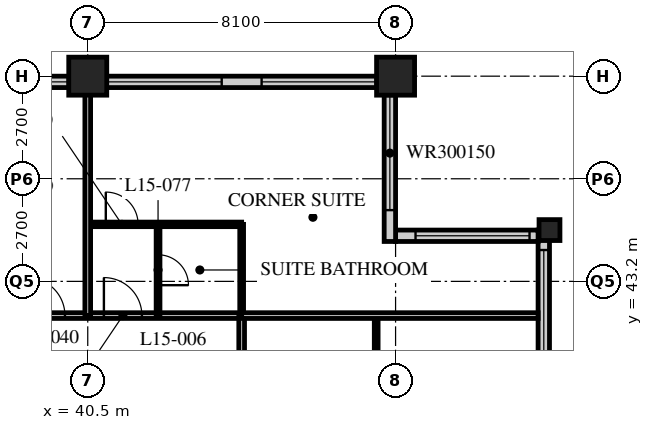
"""IFC4 building model, lengths in metres.
Left out: names, types, materials, properties, quantities, classifications, styles, units other than length and angle.
Written with IfcOpenShell. Run it as: python <this file> out.ifc"""

import sys

from ifc_helpers import new_model, si_unit, direction, frame, frame_2d, origin, origin_2d, place, context, subcontext, project, spatial, rectangle, hollow_rectangle, extrude, element, fill, save


model = new_model("IFC4")
c1 = context("Model", 3, precision=1e-05, world=origin(), true_north=direction((0.0, 1.0)))
c2 = subcontext(c1, "Body", "Model", "MODEL_VIEW")
j1 = project(units=[si_unit("LENGTHUNIT", "METRE"), si_unit("PLANEANGLEUNIT", "RADIAN")], contexts=[c1])
p1 = place(None, origin())
s1 = spatial("IfcSite", under=j1, at=p1, CompositionType="ELEMENT")
p2 = place(p1, origin())
s2 = spatial("IfcBuilding", under=s1, at=p2, CompositionType="ELEMENT")
p3 = place(p2, frame((0.0, 0.0, 63.6)))
s3 = spatial("IfcBuildingStorey", under=s2, at=p3, CompositionType="ELEMENT", Elevation=63.6)
for number, where, z_axis, x_axis in (
    (1, (40.5, 48.6, 0.0), (0.0, 0.0, 1.0), (1.0, 0.0, 0.0)),
    (2, (48.6, 48.6, 0.0), (0.0, 0.0, 1.0), (1.0, 0.0, 0.0)),
):
    element("IfcColumn", number, at=place(p3, frame(where, z_axis=z_axis, x_axis=x_axis)), inside=s3, PredefinedType="COLUMN", context=c2, shape_type="SweptSolid", body=[
        extrude(hollow_rectangle(XDim=1.0, YDim=1.0, WallThickness=0.1, at=origin_2d()), origin(), (0.0, 0.0, 1.0), 3.4),
    ])
p4 = place(p3, frame((52.65, 44.55, 0.0), z_axis=(0.0, 0.0, 1.0), x_axis=(1.0, 0.0, 0.0)))
e3 = element("IfcColumn", 3, at=p4, inside=s3, PredefinedType="COLUMN", context=c2, shape_type="SweptSolid", body=[
    extrude(hollow_rectangle(XDim=0.55, YDim=0.55, WallThickness=0.05, at=origin_2d()), origin(), (0.0, 0.0, 1.0), 3.4),
])
p5 = place(p3, frame((52.5, 40.2, 0.0), z_axis=(0.0, 0.0, 1.0), x_axis=(0.0, 1.0, 0.0)))
e4 = element("IfcWall", 4, at=p5, inside=s3, PredefinedType="SOLIDWALL", context=c2, shape_type="SweptSolid", body=[
    extrude(rectangle(XDim=4.35, YDim=0.3, at=frame_2d((2.175, 0.0))), origin(), (0.0, 0.0, 1.0), 3.19),
])
p6 = place(p5, frame((0.825, 0.0, 0.9)))
e5 = element("IfcOpeningElement", 5, at=p6, cuts=e4, PredefinedType="OPENING", context=c2, shape_type="SweptSolid", body=[
    extrude(rectangle(XDim=3.0, YDim=1.5, at=frame_2d((1.5, 0.75))), frame((0.0, 0.16, 0.0), z_axis=(0.0, -1.0, 0.0), x_axis=(1.0, 0.0, 0.0)), (0.0, 0.0, 1.0), 0.32),
])
p7 = place(p3, frame((52.35, 44.4, 0.0), z_axis=(0.0, 0.0, 1.0), x_axis=(-1.0, 0.0, 0.0)))
e6 = element("IfcWall", 6, at=p7, inside=s3, PredefinedType="SOLIDWALL", context=c2, shape_type="SweptSolid", body=[
    extrude(rectangle(XDim=3.75, YDim=0.3, at=frame_2d((1.875, 0.0))), origin(), (0.0, 0.0, 1.0), 3.19),
])
p8 = place(p7, frame((0.225, 0.0, 0.9)))
e7 = element("IfcOpeningElement", 7, at=p8, cuts=e6, PredefinedType="OPENING", context=c2, shape_type="SweptSolid", body=[
    extrude(rectangle(XDim=3.0, YDim=1.5, at=frame_2d((1.5, 0.75))), frame((0.0, 0.16, 0.0), z_axis=(0.0, -1.0, 0.0), x_axis=(1.0, 0.0, 0.0)), (0.0, 0.0, 1.0), 0.32),
])
p9 = place(p3, frame((48.45, 44.25, 0.0), z_axis=(0.0, 0.0, 1.0), x_axis=(0.0, 1.0, 0.0)))
e8 = element("IfcWall", 8, at=p9, inside=s3, PredefinedType="SOLIDWALL", context=c2, shape_type="SweptSolid", body=[
    extrude(rectangle(XDim=4.35, YDim=0.3, at=frame_2d((2.175, 0.0))), origin(), (0.0, 0.0, 1.0), 3.19),
])
p10 = place(p9, frame((0.825, 0.0, 0.9)))
e9 = element("IfcOpeningElement", 9, at=p10, cuts=e8, PredefinedType="OPENING", context=c2, shape_type="SweptSolid", body=[
    extrude(rectangle(XDim=3.0, YDim=1.5, at=frame_2d((1.5, 0.75))), frame((0.0, 0.16, 0.0), z_axis=(0.0, -1.0, 0.0), x_axis=(1.0, 0.0, 0.0)), (0.0, 0.0, 1.0), 0.32),
])
p11 = place(p3, frame((48.3, 48.45, 0.0), z_axis=(0.0, 0.0, 1.0), x_axis=(-1.0, 0.0, 0.0)))
e10 = element("IfcWall", 10, at=p11, inside=s3, PredefinedType="SOLIDWALL", context=c2, shape_type="SweptSolid", body=[
    extrude(rectangle(XDim=40.2, YDim=0.3, at=frame_2d((20.1, 0.0))), origin(), (0.0, 0.0, 1.0), 3.19),
])
p12 = place(p11, frame((0.225, 0.0, 0.9)))
e11 = element("IfcOpeningElement", 11, at=p12, cuts=e10, PredefinedType="OPENING", context=c2, shape_type="SweptSolid", body=[
    extrude(rectangle(XDim=3.0, YDim=2.0, at=frame_2d((1.5, 1.0))), frame((0.0, 0.16, 0.0), z_axis=(0.0, -1.0, 0.0), x_axis=(1.0, 0.0, 0.0)), (0.0, 0.0, 1.0), 0.32),
])
p13 = place(p11, frame((4.275, 0.0, 0.9)))
e12 = element("IfcOpeningElement", 12, at=p13, cuts=e10, PredefinedType="OPENING", context=c2, shape_type="SweptSolid", body=[
    extrude(rectangle(XDim=3.0, YDim=2.0, at=frame_2d((1.5, 1.0))), frame((0.0, 0.16, 0.0), z_axis=(0.0, -1.0, 0.0), x_axis=(1.0, 0.0, 0.0)), (0.0, 0.0, 1.0), 0.32),
])
p14 = place(p11, frame((8.325, 0.0, 0.9)))
e13 = element("IfcOpeningElement", 13, at=p14, cuts=e10, PredefinedType="OPENING", context=c2, shape_type="SweptSolid", body=[
    extrude(rectangle(XDim=3.0, YDim=2.0, at=frame_2d((1.5, 1.0))), frame((0.0, 0.16, 0.0), z_axis=(0.0, -1.0, 0.0), x_axis=(1.0, 0.0, 0.0)), (0.0, 0.0, 1.0), 0.32),
])
p15 = place(p11, frame((12.375, 0.0, 0.9)))
e14 = element("IfcOpeningElement", 14, at=p15, cuts=e10, PredefinedType="OPENING", context=c2, shape_type="SweptSolid", body=[
    extrude(rectangle(XDim=3.0, YDim=2.0, at=frame_2d((1.5, 1.0))), frame((0.0, 0.16, 0.0), z_axis=(0.0, -1.0, 0.0), x_axis=(1.0, 0.0, 0.0)), (0.0, 0.0, 1.0), 0.32),
])
p16 = place(p11, frame((16.425, 0.0, 0.9)))
e15 = element("IfcOpeningElement", 15, at=p16, cuts=e10, PredefinedType="OPENING", context=c2, shape_type="SweptSolid", body=[
    extrude(rectangle(XDim=3.0, YDim=2.0, at=frame_2d((1.5, 1.0))), frame((0.0, 0.16, 0.0), z_axis=(0.0, -1.0, 0.0), x_axis=(1.0, 0.0, 0.0)), (0.0, 0.0, 1.0), 0.32),
])
p17 = place(p11, frame((20.475, 0.0, 0.9)))
e16 = element("IfcOpeningElement", 16, at=p17, cuts=e10, PredefinedType="OPENING", context=c2, shape_type="SweptSolid", body=[
    extrude(rectangle(XDim=3.0, YDim=2.0, at=frame_2d((1.5, 1.0))), frame((0.0, 0.16, 0.0), z_axis=(0.0, -1.0, 0.0), x_axis=(1.0, 0.0, 0.0)), (0.0, 0.0, 1.0), 0.32),
])
p18 = place(p11, frame((24.525, 0.0, 0.9)))
e17 = element("IfcOpeningElement", 17, at=p18, cuts=e10, PredefinedType="OPENING", context=c2, shape_type="SweptSolid", body=[
    extrude(rectangle(XDim=3.0, YDim=2.0, at=frame_2d((1.5, 1.0))), frame((0.0, 0.16, 0.0), z_axis=(0.0, -1.0, 0.0), x_axis=(1.0, 0.0, 0.0)), (0.0, 0.0, 1.0), 0.32),
])
p19 = place(p11, frame((28.575, 0.0, 0.9)))
e18 = element("IfcOpeningElement", 18, at=p19, cuts=e10, PredefinedType="OPENING", context=c2, shape_type="SweptSolid", body=[
    extrude(rectangle(XDim=3.0, YDim=2.0, at=frame_2d((1.5, 1.0))), frame((0.0, 0.16, 0.0), z_axis=(0.0, -1.0, 0.0), x_axis=(1.0, 0.0, 0.0)), (0.0, 0.0, 1.0), 0.32),
])
p20 = place(p11, frame((32.625, 0.0, 0.9)))
e19 = element("IfcOpeningElement", 19, at=p20, cuts=e10, PredefinedType="OPENING", context=c2, shape_type="SweptSolid", body=[
    extrude(rectangle(XDim=3.0, YDim=2.0, at=frame_2d((1.5, 1.0))), frame((0.0, 0.16, 0.0), z_axis=(0.0, -1.0, 0.0), x_axis=(1.0, 0.0, 0.0)), (0.0, 0.0, 1.0), 0.32),
])
p21 = place(p11, frame((36.675, 0.0, 0.9)))
e20 = element("IfcOpeningElement", 20, at=p21, cuts=e10, PredefinedType="OPENING", context=c2, shape_type="SweptSolid", body=[
    extrude(rectangle(XDim=3.0, YDim=2.0, at=frame_2d((1.5, 1.0))), frame((0.0, 0.16, 0.0), z_axis=(0.0, -1.0, 0.0), x_axis=(1.0, 0.0, 0.0)), (0.0, 0.0, 1.0), 0.32),
])
p22 = place(p3, frame((8.1, 42.3, 0.0), z_axis=(0.0, 0.0, 1.0), x_axis=(1.0, 0.0, 0.0)))
e21 = element("IfcWall", 21, at=p22, inside=s3, PredefinedType="PARTITIONING", context=c2, shape_type="SweptSolid", body=[
    extrude(rectangle(XDim=36.45, YDim=0.15, at=frame_2d((18.225, 0.0))), origin(), (0.0, 0.0, 1.0), 3.19),
])
p23 = place(p22, frame((9.5, 0.0, 0.0)))
e22 = element("IfcOpeningElement", 22, at=p23, cuts=e21, PredefinedType="OPENING", context=c2, shape_type="SweptSolid", body=[
    extrude(rectangle(XDim=1.0, YDim=2.1, at=frame_2d((0.5, 1.05))), frame((0.0, 0.085, 0.0), z_axis=(0.0, -1.0, 0.0), x_axis=(1.0, 0.0, 0.0)), (0.0, 0.0, 1.0), 0.17),
])
p24 = place(p22, frame((14.6, 0.0, 0.0)))
e23 = element("IfcOpeningElement", 23, at=p24, cuts=e21, PredefinedType="OPENING", context=c2, shape_type="SweptSolid", body=[
    extrude(rectangle(XDim=1.0, YDim=2.1, at=frame_2d((0.5, 1.05))), frame((0.0, 0.085, 0.0), z_axis=(0.0, -1.0, 0.0), x_axis=(1.0, 0.0, 0.0)), (0.0, 0.0, 1.0), 0.17),
])
p25 = place(p22, frame((18.65, 0.0, 0.0)))
e24 = element("IfcOpeningElement", 24, at=p25, cuts=e21, PredefinedType="OPENING", context=c2, shape_type="SweptSolid", body=[
    extrude(rectangle(XDim=1.0, YDim=2.1, at=frame_2d((0.5, 1.05))), frame((0.0, 0.085, 0.0), z_axis=(0.0, -1.0, 0.0), x_axis=(1.0, 0.0, 0.0)), (0.0, 0.0, 1.0), 0.17),
])
p26 = place(p22, frame((25.7, 0.0, 0.0)))
e25 = element("IfcOpeningElement", 25, at=p26, cuts=e21, PredefinedType="OPENING", context=c2, shape_type="SweptSolid", body=[
    extrude(rectangle(XDim=1.0, YDim=2.1, at=frame_2d((0.5, 1.05))), frame((0.0, 0.085, 0.0), z_axis=(0.0, -1.0, 0.0), x_axis=(1.0, 0.0, 0.0)), (0.0, 0.0, 1.0), 0.17),
])
p27 = place(p22, frame((30.8, 0.0, 0.0)))
e26 = element("IfcOpeningElement", 26, at=p27, cuts=e21, PredefinedType="OPENING", context=c2, shape_type="SweptSolid", body=[
    extrude(rectangle(XDim=1.0, YDim=2.1, at=frame_2d((0.5, 1.05))), frame((0.0, 0.085, 0.0), z_axis=(0.0, -1.0, 0.0), x_axis=(1.0, 0.0, 0.0)), (0.0, 0.0, 1.0), 0.17),
])
p28 = place(p22, frame((32.825, 0.0, 0.0)))
e27 = element("IfcOpeningElement", 27, at=p28, cuts=e21, PredefinedType="OPENING", context=c2, shape_type="SweptSolid", body=[
    extrude(rectangle(XDim=1.0, YDim=2.1, at=frame_2d((0.5, 1.05))), frame((0.0, 0.085, 0.0), z_axis=(0.0, -1.0, 0.0), x_axis=(1.0, 0.0, 0.0)), (0.0, 0.0, 1.0), 0.17),
])
p29 = place(p22, frame((2.625, 0.0, 0.0)))
e28 = element("IfcOpeningElement", 28, at=p29, cuts=e21, PredefinedType="OPENING", context=c2, shape_type="SweptSolid", body=[
    extrude(rectangle(XDim=1.0, YDim=2.1, at=frame_2d((0.5, 1.05))), frame((0.0, 0.085, 0.0), z_axis=(0.0, -1.0, 0.0), x_axis=(1.0, 0.0, 0.0)), (0.0, 0.0, 1.0), 0.17),
])
p30 = place(p3, frame((44.55, 12.15, 0.0), z_axis=(0.0, 0.0, 1.0), x_axis=(0.0, 1.0, 0.0)))
e29 = element("IfcWall", 29, at=p30, inside=s3, PredefinedType="PARTITIONING", context=c2, shape_type="SweptSolid", body=[
    extrude(rectangle(XDim=30.15, YDim=0.15, at=frame_2d((15.075, 0.0))), origin(), (0.0, 0.0, 1.0), 3.19),
])
p31 = place(p30, frame((2.45, 0.0, 0.0)))
e30 = element("IfcOpeningElement", 30, at=p31, cuts=e29, PredefinedType="OPENING", context=c2, shape_type="SweptSolid", body=[
    extrude(rectangle(XDim=1.0, YDim=2.1, at=frame_2d((0.5, 1.05))), frame((0.0, 0.085, 0.0), z_axis=(0.0, -1.0, 0.0), x_axis=(1.0, 0.0, 0.0)), (0.0, 0.0, 1.0), 0.17),
])
p32 = place(p30, frame((4.35, 0.0, 0.0)))
e31 = element("IfcOpeningElement", 31, at=p32, cuts=e29, PredefinedType="OPENING", context=c2, shape_type="SweptSolid", body=[
    extrude(rectangle(XDim=1.0, YDim=2.1, at=frame_2d((0.5, 1.05))), frame((0.0, 0.085, 0.0), z_axis=(0.0, -1.0, 0.0), x_axis=(1.0, 0.0, 0.0)), (0.0, 0.0, 1.0), 0.17),
])
p33 = place(p30, frame((8.4, 0.0, 0.0)))
e32 = element("IfcOpeningElement", 32, at=p33, cuts=e29, PredefinedType="OPENING", context=c2, shape_type="SweptSolid", body=[
    extrude(rectangle(XDim=1.0, YDim=2.1, at=frame_2d((0.5, 1.05))), frame((0.0, 0.085, 0.0), z_axis=(0.0, -1.0, 0.0), x_axis=(1.0, 0.0, 0.0)), (0.0, 0.0, 1.0), 0.17),
])
p34 = place(p30, frame((14.6, 0.0, 0.0)))
e33 = element("IfcOpeningElement", 33, at=p34, cuts=e29, PredefinedType="OPENING", context=c2, shape_type="SweptSolid", body=[
    extrude(rectangle(XDim=1.0, YDim=2.1, at=frame_2d((0.5, 1.05))), frame((0.0, 0.085, 0.0), z_axis=(0.0, -1.0, 0.0), x_axis=(1.0, 0.0, 0.0)), (0.0, 0.0, 1.0), 0.17),
])
p35 = place(p30, frame((21.65, 0.0, 0.0)))
e34 = element("IfcOpeningElement", 34, at=p35, cuts=e29, PredefinedType="OPENING", context=c2, shape_type="SweptSolid", body=[
    extrude(rectangle(XDim=1.0, YDim=2.1, at=frame_2d((0.5, 1.05))), frame((0.0, 0.085, 0.0), z_axis=(0.0, -1.0, 0.0), x_axis=(1.0, 0.0, 0.0)), (0.0, 0.0, 1.0), 0.17),
])
p36 = place(p30, frame((26.7, 0.0, 0.0)))
e35 = element("IfcOpeningElement", 35, at=p36, cuts=e29, PredefinedType="OPENING", context=c2, shape_type="SweptSolid", body=[
    extrude(rectangle(XDim=1.0, YDim=2.1, at=frame_2d((0.5, 1.05))), frame((0.0, 0.085, 0.0), z_axis=(0.0, -1.0, 0.0), x_axis=(1.0, 0.0, 0.0)), (0.0, 0.0, 1.0), 0.17),
])
p37 = place(p3, frame((48.09, 40.0, 0.0), z_axis=(0.0, 0.0, 1.0), x_axis=(0.0, 1.0, 0.0)))
e36 = element("IfcWall", 36, at=p37, inside=s3, PredefinedType="PARTITIONING", context=c2, shape_type="SweptSolid", body=[
    extrude(rectangle(XDim=2.3, YDim=0.1, at=frame_2d((1.15, 0.0))), origin(), (0.0, 0.0, 1.0), 3.19),
])
p38 = place(p3, frame((40.5, 44.7, 0.0), z_axis=(0.0, 0.0, 1.0), x_axis=(1.0, 0.0, 0.0)))
e37 = element("IfcWall", 37, at=p38, inside=s3, PredefinedType="PARTITIONING", context=c2, shape_type="SweptSolid", body=[
    extrude(rectangle(XDim=4.05, YDim=0.12, at=frame_2d((2.025, 0.0))), origin(), (0.0, 0.0, 1.0), 3.19),
])
p39 = place(p38, frame((0.475, 0.0, 0.0)))
e38 = element("IfcOpeningElement", 38, at=p39, cuts=e37, PredefinedType="OPENING", context=c2, shape_type="SweptSolid", body=[
    extrude(rectangle(XDim=0.85, YDim=2.1, at=frame_2d((0.425, 1.05))), frame((0.0, 0.07, 0.0), z_axis=(0.0, -1.0, 0.0), x_axis=(1.0, 0.0, 0.0)), (0.0, 0.0, 1.0), 0.14),
])
p40 = place(p3, frame((42.35, 42.3, 0.0), z_axis=(0.0, 0.0, 1.0), x_axis=(0.0, 1.0, 0.0)))
e39 = element("IfcWall", 39, at=p40, inside=s3, PredefinedType="PARTITIONING", context=c2, shape_type="SweptSolid", body=[
    extrude(rectangle(XDim=2.4, YDim=0.1, at=frame_2d((1.2, 0.0))), origin(), (0.0, 0.0, 1.0), 3.19),
])
p41 = place(p40, frame((0.8, 0.0, 0.0)))
e40 = element("IfcOpeningElement", 40, at=p41, cuts=e39, PredefinedType="OPENING", context=c2, shape_type="SweptSolid", body=[
    extrude(rectangle(XDim=0.8, YDim=2.1, at=frame_2d((0.4, 1.05))), frame((0.0, 0.06, 0.0), z_axis=(0.0, -1.0, 0.0), x_axis=(1.0, 0.0, 0.0)), (0.0, 0.0, 1.0), 0.12),
])
p42 = place(p3, frame((44.55, 42.3, 0.0), z_axis=(0.0, 0.0, 1.0), x_axis=(0.0, 1.0, 0.0)))
e41 = element("IfcWall", 41, at=p42, inside=s3, PredefinedType="PARTITIONING", context=c2, shape_type="SweptSolid", body=[
    extrude(rectangle(XDim=2.4, YDim=0.1, at=frame_2d((1.2, 0.0))), origin(), (0.0, 0.0, 1.0), 3.19),
])
p43 = place(p3, frame((44.55, 42.3, 0.0), z_axis=(0.0, 0.0, 1.0), x_axis=(1.0, 0.0, 0.0)))
e42 = element("IfcWall", 42, at=p43, inside=s3, PredefinedType="PARTITIONING", context=c2, shape_type="SweptSolid", body=[
    extrude(rectangle(XDim=7.8, YDim=0.15, at=frame_2d((3.9, 0.0))), origin(), (0.0, 0.0, 1.0), 3.19),
])
p44 = place(p3, frame((40.5, 42.3, 0.0), z_axis=(0.0, 0.0, 1.0), x_axis=(0.0, 1.0, 0.0)))
e43 = element("IfcWall", 43, at=p44, inside=s3, PredefinedType="PARTITIONING", context=c2, shape_type="SweptSolid", body=[
    extrude(rectangle(XDim=6.0, YDim=0.15, at=frame_2d((3.0, 0.0))), origin(), (0.0, 0.0, 1.0), 2.578),
])
p45 = place(p6, origin())
e44 = element("IfcWindow", 44, at=p45, inside=s3, PartitioningType="SINGLE_PANEL", PredefinedType="WINDOW", context=c2, shape_type="SweptSolid", body=[
    extrude(rectangle(XDim=3.0, YDim=1.5, at=frame_2d((1.5, 0.75))), frame((0.0, 0.03, 0.0), z_axis=(0.0, -1.0, 0.0), x_axis=(1.0, 0.0, 0.0)), (0.0, 0.0, 1.0), 0.06),
])
fill(e5, e44)
p46 = place(p8, origin())
e45 = element("IfcWindow", 45, at=p46, inside=s3, PartitioningType="SINGLE_PANEL", PredefinedType="WINDOW", context=c2, shape_type="SweptSolid", body=[
    extrude(rectangle(XDim=3.0, YDim=1.5, at=frame_2d((1.5, 0.75))), frame((0.0, 0.03, 0.0), z_axis=(0.0, -1.0, 0.0), x_axis=(1.0, 0.0, 0.0)), (0.0, 0.0, 1.0), 0.06),
])
fill(e7, e45)
p47 = place(p10, origin())
e46 = element("IfcWindow", 46, at=p47, inside=s3, PartitioningType="SINGLE_PANEL", PredefinedType="WINDOW", context=c2, shape_type="SweptSolid", body=[
    extrude(rectangle(XDim=3.0, YDim=1.5, at=frame_2d((1.5, 0.75))), frame((0.0, 0.03, 0.0), z_axis=(0.0, -1.0, 0.0), x_axis=(1.0, 0.0, 0.0)), (0.0, 0.0, 1.0), 0.06),
])
fill(e9, e46)
p48 = place(p12, origin())
e47 = element("IfcWindow", 47, at=p48, inside=s3, PartitioningType="SINGLE_PANEL", PredefinedType="WINDOW", context=c2, shape_type="SweptSolid", body=[
    extrude(rectangle(XDim=3.0, YDim=2.0, at=frame_2d((1.5, 1.0))), frame((0.0, 0.03, 0.0), z_axis=(0.0, -1.0, 0.0), x_axis=(1.0, 0.0, 0.0)), (0.0, 0.0, 1.0), 0.06),
])
fill(e11, e47)
p49 = place(p13, origin())
e48 = element("IfcWindow", 48, at=p49, inside=s3, PartitioningType="SINGLE_PANEL", PredefinedType="WINDOW", context=c2, shape_type="SweptSolid", body=[
    extrude(rectangle(XDim=3.0, YDim=2.0, at=frame_2d((1.5, 1.0))), frame((0.0, 0.03, 0.0), z_axis=(0.0, -1.0, 0.0), x_axis=(1.0, 0.0, 0.0)), (0.0, 0.0, 1.0), 0.06),
])
fill(e12, e48)
p50 = place(p14, origin())
e49 = element("IfcWindow", 49, at=p50, inside=s3, PartitioningType="SINGLE_PANEL", PredefinedType="WINDOW", context=c2, shape_type="SweptSolid", body=[
    extrude(rectangle(XDim=3.0, YDim=2.0, at=frame_2d((1.5, 1.0))), frame((0.0, 0.03, 0.0), z_axis=(0.0, -1.0, 0.0), x_axis=(1.0, 0.0, 0.0)), (0.0, 0.0, 1.0), 0.06),
])
fill(e13, e49)
p51 = place(p27, origin())
e50 = element("IfcDoor", 50, at=p51, inside=s3, OperationType="SINGLE_SWING_LEFT", PredefinedType="DOOR", context=c2, shape_type="SweptSolid", body=[
    extrude(rectangle(XDim=1.0, YDim=2.1, at=frame_2d((0.5, 1.05))), frame((0.0, 0.025, 0.0), z_axis=(0.0, -1.0, 0.0), x_axis=(1.0, 0.0, 0.0)), (0.0, 0.0, 1.0), 0.05),
])
fill(e26, e50)
p52 = place(p41, origin())
e51 = element("IfcDoor", 51, at=p52, inside=s3, OperationType="SINGLE_SWING_RIGHT", PredefinedType="DOOR", context=c2, shape_type="SweptSolid", body=[
    extrude(rectangle(XDim=0.8, YDim=2.1, at=frame_2d((0.4, 1.05))), frame((0.0, 0.025, 0.0), z_axis=(0.0, -1.0, 0.0), x_axis=(1.0, 0.0, 0.0)), (0.0, 0.0, 1.0), 0.05),
])
fill(e40, e51)
p53 = place(p28, origin())
e52 = element("IfcDoor", 52, at=p53, inside=s3, OperationType="SINGLE_SWING_LEFT", PredefinedType="DOOR", context=c2, shape_type="SweptSolid", body=[
    extrude(rectangle(XDim=1.0, YDim=2.1, at=frame_2d((0.5, 1.05))), frame((0.0, 0.025, 0.0), z_axis=(0.0, -1.0, 0.0), x_axis=(1.0, 0.0, 0.0)), (0.0, 0.0, 1.0), 0.05),
])
fill(e27, e52)
p54 = place(p39, origin())
e53 = element("IfcDoor", 53, at=p54, inside=s3, OperationType="SINGLE_SWING_LEFT", PredefinedType="DOOR", context=c2, shape_type="SweptSolid", body=[
    extrude(rectangle(XDim=0.85, YDim=2.1, at=frame_2d((0.425, 1.05))), frame((0.0, 0.025, 0.0), z_axis=(0.0, -1.0, 0.0), x_axis=(1.0, 0.0, 0.0)), (0.0, 0.0, 1.0), 0.05),
])
fill(e38, e53)
save(model, sys.argv[1])
